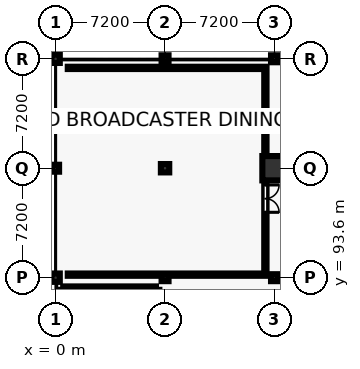
"""IFC4 building model, lengths in metres.
Left out: names, types, materials, properties, quantities, classifications, styles, units other than length and angle.
Written with IfcOpenShell. Run it as: python <this file> out.ifc"""

import sys

from ifc_helpers import new_model, si_unit, direction, frame, frame_2d, origin, origin_2d, place, context, subcontext, project, spatial, rectangle, circle, hollow_circle, extrude, element, fill, save


model = new_model("IFC4")
c1 = context("Model", 3, precision=1e-05, world=origin(), true_north=direction((0.0, 1.0)))
c2 = subcontext(c1, "Body", "Model", "MODEL_VIEW")
j1 = project(units=[si_unit("LENGTHUNIT", "METRE"), si_unit("PLANEANGLEUNIT", "RADIAN")], contexts=[c1])
p1 = place(None, origin())
s1 = spatial("IfcSite", under=j1, at=p1, CompositionType="ELEMENT")
p2 = place(p1, origin())
s2 = spatial("IfcBuilding", under=s1, at=p2, CompositionType="ELEMENT")
p3 = place(p2, frame((0.0, 0.0, 18.6)))
s3 = spatial("IfcBuildingStorey", under=s2, at=p3, CompositionType="ELEMENT", Elevation=18.6)
p4 = place(p3, frame((0.0, 93.6, 0.0), z_axis=(0.0, 0.0, 1.0), x_axis=(1.0, 0.0, 0.0)))
e1 = element("IfcColumn", 1, at=p4, inside=s3, PredefinedType="COLUMN", context=c2, shape_type="SweptSolid", body=[
    extrude(rectangle(XDim=0.55, YDim=0.55, at=origin_2d()), origin(), (0.0, 0.0, 1.0), 4.4),
])
p5 = place(p3, frame((0.0, 100.8, 0.0), z_axis=(0.0, 0.0, 1.0), x_axis=(1.0, 0.0, 0.0)))
e2 = element("IfcColumn", 2, at=p5, inside=s3, PredefinedType="COLUMN", context=c2, shape_type="SweptSolid", body=[
    extrude(hollow_circle(Radius=0.229, WallThickness=0.02, at=origin_2d()), origin(), (0.0, 0.0, 1.0), 4.4),
])
p6 = place(p3, frame((0.0, 108.0, 0.0), z_axis=(0.0, 0.0, 1.0), x_axis=(1.0, 0.0, 0.0)))
e3 = element("IfcColumn", 3, at=p6, inside=s3, PredefinedType="COLUMN", context=c2, shape_type="SweptSolid", body=[
    extrude(rectangle(XDim=0.55, YDim=0.55, at=origin_2d()), origin(), (0.0, 0.0, 1.0), 4.4),
])
p7 = place(p3, frame((7.2, 93.6, 0.0), z_axis=(0.0, 0.0, 1.0), x_axis=(1.0, 0.0, 0.0)))
e4 = element("IfcColumn", 4, at=p7, inside=s3, PredefinedType="COLUMN", context=c2, shape_type="SweptSolid", body=[
    extrude(hollow_circle(Radius=0.229, WallThickness=0.02, at=origin_2d()), origin(), (0.0, 0.0, 1.0), 4.4),
])
p8 = place(p3, frame((7.2, 100.8, 0.0), z_axis=(0.0, 0.0, 1.0), x_axis=(1.0, 0.0, 0.0)))
e5 = element("IfcColumn", 5, at=p8, inside=s3, PredefinedType="COLUMN", context=c2, shape_type="SweptSolid", body=[
    extrude(rectangle(XDim=0.55, YDim=0.55, at=origin_2d()), origin(), (0.0, 0.0, 1.0), 4.4),
])
for number, where, z_axis, x_axis in (
    (6, (7.2, 108.0, 0.0), (0.0, 0.0, 1.0), (1.0, 0.0, 0.0)),
    (7, (14.4, 93.6, 0.0), (0.0, 0.0, 1.0), (1.0, 0.0, 0.0)),
):
    element("IfcColumn", number, at=place(p3, frame(where, z_axis=z_axis, x_axis=x_axis)), inside=s3, PredefinedType="COLUMN", context=c2, shape_type="SweptSolid", body=[
        extrude(hollow_circle(Radius=0.229, WallThickness=0.02, at=origin_2d()), origin(), (0.0, 0.0, 1.0), 4.4),
    ])
p9 = place(p3, frame((14.4, 100.8, 0.0), z_axis=(0.0, 0.0, 1.0), x_axis=(1.0, 0.0, 0.0)))
e8 = element("IfcColumn", 8, at=p9, inside=s3, PredefinedType="COLUMN", context=c2, shape_type="SweptSolid", body=[
    extrude(circle(Radius=0.8, at=origin_2d()), origin(), (0.0, 0.0, 1.0), 4.4),
])
p10 = place(p3, frame((14.4, 108.0, 0.0), z_axis=(0.0, 0.0, 1.0), x_axis=(1.0, 0.0, 0.0)))
e9 = element("IfcColumn", 9, at=p10, inside=s3, PredefinedType="COLUMN", context=c2, shape_type="SweptSolid", body=[
    extrude(hollow_circle(Radius=0.229, WallThickness=0.02, at=origin_2d()), origin(), (0.0, 0.0, 1.0), 4.4),
])
p11 = place(p3, frame((0.5, 92.8, 0.0), z_axis=(0.0, 0.0, 1.0), x_axis=(1.0, 0.0, 0.0)))
e10 = element("IfcWall", 10, at=p11, inside=s3, PredefinedType="SHEAR", context=c2, shape_type="SweptSolid", body=[
    extrude(rectangle(XDim=6.1, YDim=0.45, at=frame_2d((3.05, 0.0))), origin(), (0.0, 0.0, 1.0), 4.15),
])
p12 = place(p3, frame((0.8, 93.8, 0.0), z_axis=(0.0, 0.0, 1.0), x_axis=(1.0, 0.0, 0.0)))
e11 = element("IfcWall", 11, at=p12, inside=s3, PredefinedType="PARTITIONING", context=c2, shape_type="SweptSolid", body=[
    extrude(rectangle(XDim=13.0, YDim=0.15, at=frame_2d((6.5, 0.0))), origin(), (0.0, 0.0, 1.0), 3.21),
])
p13 = place(p3, frame((13.8, 93.8, 0.0), z_axis=(0.0, 0.0, 1.0), x_axis=(0.0, 1.0, 0.0)))
e12 = element("IfcWall", 12, at=p13, inside=s3, PredefinedType="PARTITIONING", context=c2, shape_type="SweptSolid", body=[
    extrude(rectangle(XDim=13.6, YDim=0.15, at=frame_2d((6.8, 0.0))), origin(), (0.0, 0.0, 1.0), 3.21),
])
p14 = place(p13, frame((4.1, 0.0, 0.0)))
e13 = element("IfcOpeningElement", 13, at=p14, cuts=e12, PredefinedType="OPENING", context=c2, shape_type="SweptSolid", body=[
    extrude(rectangle(XDim=1.8, YDim=2.3, at=frame_2d((0.9, 1.15))), frame((0.0, 0.085, 0.0), z_axis=(0.0, -1.0, 0.0), x_axis=(1.0, 0.0, 0.0)), (0.0, 0.0, 1.0), 0.17),
])
p15 = place(p3, frame((13.8, 107.4, 0.0), z_axis=(0.0, 0.0, 1.0), x_axis=(-1.0, 0.0, 0.0)))
e14 = element("IfcWall", 14, at=p15, inside=s3, PredefinedType="PARTITIONING", context=c2, shape_type="SweptSolid", body=[
    extrude(rectangle(XDim=13.0, YDim=0.15, at=frame_2d((6.5, 0.0))), origin(), (0.0, 0.0, 1.0), 3.21),
])
p16 = place(p14, frame((1.8, 0.0, 0.0), z_axis=(0.0, 0.0, 1.0), x_axis=(-1.0, 0.0, 0.0)))
e15 = element("IfcDoor", 15, at=p16, inside=s3, OperationType="DOUBLE_DOOR_SINGLE_SWING", PredefinedType="DOOR", context=c2, shape_type="SweptSolid", body=[
    extrude(rectangle(XDim=1.8, YDim=2.3, at=frame_2d((0.9, 1.15))), frame((0.0, 0.025, 0.0), z_axis=(0.0, -1.0, 0.0), x_axis=(1.0, 0.0, 0.0)), (0.0, 0.0, 1.0), 0.05),
])
fill(e13, e15)
save(model, sys.argv[1])
